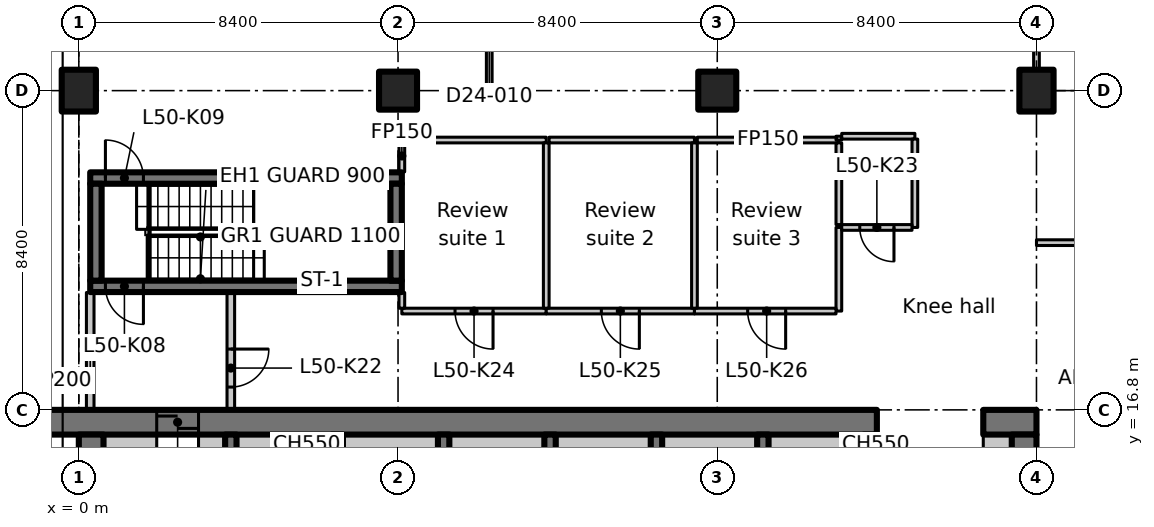
"""IFC4 building model, lengths in metres.
Left out: names, types, materials, properties, quantities, classifications, styles, units other than length and angle.
Written with IfcOpenShell. Run it as: python <this file> out.ifc"""

import sys

from ifc_helpers import new_model, si_unit, direction, frame, frame_2d, origin, origin_2d, place, context, subcontext, project, spatial, polyline, rectangle, outline, extrude, element, fill, save


model = new_model("IFC4")
c1 = context("Model", 3, precision=1e-05, world=origin(), true_north=direction((0.0, 1.0)))
c2 = subcontext(c1, "Body", "Model", "MODEL_VIEW")
j1 = project(units=[si_unit("LENGTHUNIT", "METRE"), si_unit("PLANEANGLEUNIT", "RADIAN")], contexts=[c1])
p1 = place(None, origin())
s1 = spatial("IfcSite", under=j1, at=p1, CompositionType="ELEMENT")
p2 = place(p1, origin())
s2 = spatial("IfcBuilding", under=s1, at=p2, CompositionType="ELEMENT")
p3 = place(p2, frame((0.0, 0.0, 199.2)))
s3 = spatial("IfcBuildingStorey", under=s2, at=p3, CompositionType="ELEMENT", Elevation=199.2)
p4 = place(p3, frame((0.0, 25.2, 0.0), z_axis=(0.0, 0.0, 1.0), x_axis=(1.0, 0.0, 0.0)))
e1 = element("IfcColumn", 1, at=p4, inside=s3, PredefinedType="COLUMN", context=c2, shape_type="SweptSolid", body=[
    extrude(rectangle(XDim=0.9, YDim=1.1, at=origin_2d()), origin(), (0.0, 0.0, 1.0), 3.35),
])
for number, where, z_axis, x_axis in (
    (2, (8.4, 25.2, 0.0), (0.0, 0.0, 1.0), (1.0, 0.0, 0.0)),
    (3, (16.8, 25.2, 0.0), (0.0, 0.0, 1.0), (1.0, 0.0, 0.0)),
):
    element("IfcColumn", number, at=place(p3, frame(where, z_axis=z_axis, x_axis=x_axis)), inside=s3, PredefinedType="COLUMN", context=c2, shape_type="SweptSolid", body=[
        extrude(rectangle(XDim=1.0, YDim=1.0, at=origin_2d()), origin(), (0.0, 0.0, 1.0), 3.35),
    ])
p5 = place(p3, frame((25.2, 25.2, 0.0), z_axis=(0.0, 0.0, 1.0), x_axis=(1.0, 0.0, 0.0)))
e4 = element("IfcColumn", 4, at=p5, inside=s3, PredefinedType="COLUMN", context=c2, shape_type="SweptSolid", body=[
    extrude(rectangle(XDim=0.9, YDim=1.1, at=origin_2d()), origin(), (0.0, 0.0, 1.0), 3.35),
])
p6 = place(p3, frame((-1.1, 16.475, 0.0), z_axis=(0.0, 0.0, 1.0), x_axis=(1.0, 0.0, 0.0)))
e5 = element("IfcWall", 5, at=p6, inside=s3, PredefinedType="SHEAR", context=c2, shape_type="SweptSolid", body=[
    extrude(rectangle(XDim=22.1, YDim=0.65, at=frame_2d((11.05, 0.0))), origin(), (0.0, 0.0, 1.0), 3.35),
])
p7 = place(p6, frame((3.15, 0.0, 0.0)))
e6 = element("IfcOpeningElement", 6, at=p7, cuts=e5, PredefinedType="OPENING", context=c2, shape_type="SweptSolid", body=[
    extrude(rectangle(XDim=1.1, YDim=2.3, at=frame_2d((0.55, 1.15))), frame((0.0, 0.335, 0.0), z_axis=(0.0, -1.0, 0.0), x_axis=(1.0, 0.0, 0.0)), (0.0, 0.0, 1.0), 0.67),
])
p8 = place(p3, frame((23.8, 16.475, 0.0), z_axis=(0.0, 0.0, 1.0), x_axis=(1.0, 0.0, 0.0)))
e7 = element("IfcWall", 7, at=p8, inside=s3, PredefinedType="SHEAR", context=c2, shape_type="SweptSolid", body=[
    extrude(rectangle(XDim=1.4, YDim=0.65, at=frame_2d((0.7, 0.0))), origin(), (0.0, 0.0, 1.0), 3.35),
])
p9 = place(p3, frame((0.325, 7.286, 0.0), z_axis=(0.0, 0.0, 1.0), x_axis=(0.0, 1.0, 0.0)))
e8 = element("IfcWall", 8, at=p9, inside=s3, PredefinedType="SHEAR", context=c2, shape_type="SweptSolid", body=[
    extrude(rectangle(XDim=8.864, YDim=0.65, at=frame_2d((4.432, 0.0))), origin(), (0.0, 0.0, 1.0), 3.35),
])
p10 = place(p3, frame((24.875, 12.6, 0.0), z_axis=(0.0, 0.0, 1.0), x_axis=(0.0, 1.0, 0.0)))
e9 = element("IfcWall", 9, at=p10, inside=s3, PredefinedType="SHEAR", context=c2, shape_type="SweptSolid", body=[
    extrude(rectangle(XDim=3.55, YDim=0.65, at=frame_2d((1.775, 0.0))), origin(), (0.0, 0.0, 1.0), 3.35),
])
p11 = place(p3, frame((0.65, 15.875, 0.0), z_axis=(0.0, 0.0, 1.0), x_axis=(1.0, 0.0, 0.0)))
e10 = element("IfcWall", 10, at=p11, inside=s3, PredefinedType="PARTITIONING", context=c2, shape_type="SweptSolid", body=[
    extrude(rectangle(XDim=1.4, YDim=0.55, at=frame_2d((0.7, 0.0))), origin(), (0.0, 0.0, 1.0), 3.35),
])
p12 = place(p3, frame((23.8, 15.875, 0.0), z_axis=(0.0, 0.0, 1.0), x_axis=(1.0, 0.0, 0.0)))
e11 = element("IfcWall", 11, at=p12, inside=s3, PredefinedType="PARTITIONING", context=c2, shape_type="SweptSolid", body=[
    extrude(rectangle(XDim=0.75, YDim=0.55, at=frame_2d((0.375, 0.0))), origin(), (0.0, 0.0, 1.0), 3.35),
])
for number, where, z_axis, x_axis in (
    (12, (4.0, 12.95, 0.0), (0.0, 0.0, 1.0), (0.0, 1.0, 0.0)),
    (13, (6.8, 12.95, 0.0), (0.0, 0.0, 1.0), (0.0, 1.0, 0.0)),
    (14, (9.6, 12.95, 0.0), (0.0, 0.0, 1.0), (0.0, 1.0, 0.0)),
    (15, (12.4, 12.95, 0.0), (0.0, 0.0, 1.0), (0.0, 1.0, 0.0)),
    (16, (15.2, 12.95, 0.0), (0.0, 0.0, 1.0), (0.0, 1.0, 0.0)),
    (17, (18.0, 12.95, 0.0), (0.0, 0.0, 1.0), (0.0, 1.0, 0.0)),
    (18, (20.8, 12.95, 0.0), (0.0, 0.0, 1.0), (0.0, 1.0, 0.0)),
):
    element("IfcWall", number, at=place(p3, frame(where, z_axis=z_axis, x_axis=x_axis)), inside=s3, PredefinedType="SHEAR", context=c2, shape_type="SweptSolid", body=[
        extrude(rectangle(XDim=3.2, YDim=0.3, at=frame_2d((1.6, 0.0))), origin(), (0.0, 0.0, 1.0), 3.35),
    ])
p13 = place(p3, frame((8.5, 20.05, 0.0), z_axis=(0.0, 0.0, 1.0), x_axis=(-1.0, 0.0, 0.0)))
e19 = element("IfcWall", 19, at=p13, inside=s3, PredefinedType="SHEAR", context=c2, shape_type="SweptSolid", body=[
    extrude(rectangle(XDim=8.2, YDim=0.3, at=frame_2d((4.1, 0.0))), origin(), (0.0, 0.0, 1.0), 3.35),
])
p14 = place(p13, frame((6.8, 0.0, 0.0)))
e20 = element("IfcOpeningElement", 20, at=p14, cuts=e19, PredefinedType="OPENING", context=c2, shape_type="SweptSolid", body=[
    extrude(rectangle(XDim=1.0, YDim=2.1, at=frame_2d((0.5, 1.05))), frame((0.0, 0.16, 0.0), z_axis=(0.0, -1.0, 0.0), x_axis=(1.0, 0.0, 0.0)), (0.0, 0.0, 1.0), 0.32),
])
p15 = place(p3, frame((0.3, 22.9, 0.0), z_axis=(0.0, 0.0, 1.0), x_axis=(1.0, 0.0, 0.0)))
e21 = element("IfcWall", 21, at=p15, inside=s3, PredefinedType="SHEAR", context=c2, shape_type="SweptSolid", body=[
    extrude(rectangle(XDim=8.2, YDim=0.3, at=frame_2d((4.1, 0.0))), origin(), (0.0, 0.0, 1.0), 3.35),
])
p16 = place(p15, frame((0.4, 0.0, 0.0)))
e22 = element("IfcOpeningElement", 22, at=p16, cuts=e21, PredefinedType="OPENING", context=c2, shape_type="SweptSolid", body=[
    extrude(rectangle(XDim=1.0, YDim=2.1, at=frame_2d((0.5, 1.05))), frame((0.0, 0.16, 0.0), z_axis=(0.0, -1.0, 0.0), x_axis=(1.0, 0.0, 0.0)), (0.0, 0.0, 1.0), 0.32),
])
for number, where, z_axis, x_axis in (
    (23, (0.45, 20.2, 0.0), (0.0, 0.0, 1.0), (0.0, 1.0, 0.0)),
    (24, (8.35, 20.2, 0.0), (0.0, 0.0, 1.0), (0.0, 1.0, 0.0)),
):
    element("IfcWall", number, at=place(p3, frame(where, z_axis=z_axis, x_axis=x_axis)), inside=s3, PredefinedType="SHEAR", context=c2, shape_type="SweptSolid", body=[
        extrude(rectangle(XDim=2.55, YDim=0.3, at=frame_2d((1.275, 0.0))), origin(), (0.0, 0.0, 1.0), 3.35),
    ])
p17 = place(p3, frame((0.3, 16.812, 0.0), z_axis=(0.0, 0.0, 1.0), x_axis=(0.0, 1.0, 0.0)))
e25 = element("IfcWall", 25, at=p17, inside=s3, PredefinedType="PARTITIONING", context=c2, shape_type="SweptSolid", body=[
    extrude(rectangle(XDim=3.076, YDim=0.2, at=frame_2d((1.538, 0.0))), origin(), (0.0, 0.0, 1.0), 2.98),
])
p18 = place(p3, frame((4.0, 19.888, 0.0), z_axis=(0.0, 0.0, 1.0), x_axis=(0.0, -1.0, 0.0)))
e26 = element("IfcWall", 26, at=p18, inside=s3, PredefinedType="PARTITIONING", context=c2, shape_type="SweptSolid", body=[
    extrude(rectangle(XDim=3.076, YDim=0.2, at=frame_2d((1.538, 0.0))), origin(), (0.0, 0.0, 1.0), 3.35),
])
p19 = place(p18, frame((1.488, 0.0, 0.0)))
e27 = element("IfcOpeningElement", 27, at=p19, cuts=e26, PredefinedType="OPENING", context=c2, shape_type="SweptSolid", body=[
    extrude(rectangle(XDim=1.0, YDim=2.1, at=frame_2d((0.5, 1.05))), frame((0.0, 0.11, 0.0), z_axis=(0.0, -1.0, 0.0), x_axis=(1.0, 0.0, 0.0)), (0.0, 0.0, 1.0), 0.22),
])
p20 = place(p3, frame((12.3, 19.4, 0.0), z_axis=(0.0, 0.0, 1.0), x_axis=(-1.0, 0.0, 0.0)))
e28 = element("IfcWall", 28, at=p20, inside=s3, PredefinedType="PARTITIONING", context=c2, shape_type="SweptSolid", body=[
    extrude(rectangle(XDim=3.8, YDim=0.15, at=frame_2d((1.9, 0.0))), origin(), (0.0, 0.0, 1.0), 3.35),
])
p21 = place(p20, frame((1.4, 0.0, 0.0)))
e29 = element("IfcOpeningElement", 29, at=p21, cuts=e28, PredefinedType="OPENING", context=c2, shape_type="SweptSolid", body=[
    extrude(rectangle(XDim=1.0, YDim=2.1, at=frame_2d((0.5, 1.05))), frame((0.0, 0.085, 0.0), z_axis=(0.0, -1.0, 0.0), x_axis=(1.0, 0.0, 0.0)), (0.0, 0.0, 1.0), 0.17),
])
p22 = place(p3, frame((8.5, 19.475, 0.0), z_axis=(0.0, 0.0, 1.0), x_axis=(0.0, 1.0, 0.0)))
e30 = element("IfcWall", 30, at=p22, inside=s3, PredefinedType="PARTITIONING", context=c2, shape_type="SweptSolid", body=[
    extrude(rectangle(XDim=0.413, YDim=0.15, at=frame_2d((0.207, 0.0))), origin(), (0.0, 0.0, 1.0), 3.35),
])
p23 = place(p3, frame((8.5, 23.062, 0.0), z_axis=(0.0, 0.0, 1.0), x_axis=(0.0, 1.0, 0.0)))
e31 = element("IfcWall", 31, at=p23, inside=s3, PredefinedType="PARTITIONING", context=c2, shape_type="SweptSolid", body=[
    extrude(rectangle(XDim=0.838, YDim=0.15, at=frame_2d((0.419, 0.0))), origin(), (0.0, 0.0, 1.0), 3.35),
])
p24 = place(p3, frame((8.575, 23.9, 0.0), z_axis=(0.0, 0.0, 1.0), x_axis=(1.0, 0.0, 0.0)))
e32 = element("IfcWall", 32, at=p24, inside=s3, PredefinedType="PARTITIONING", context=c2, shape_type="SweptSolid", body=[
    extrude(rectangle(XDim=3.725, YDim=0.15, at=frame_2d((1.863, 0.0))), origin(), (0.0, 0.0, 1.0), 3.35),
])
p25 = place(p3, frame((16.2, 19.4, 0.0), z_axis=(0.0, 0.0, 1.0), x_axis=(-1.0, 0.0, 0.0)))
e33 = element("IfcWall", 33, at=p25, inside=s3, PredefinedType="PARTITIONING", context=c2, shape_type="SweptSolid", body=[
    extrude(rectangle(XDim=3.9, YDim=0.15, at=frame_2d((1.95, 0.0))), origin(), (0.0, 0.0, 1.0), 3.35),
])
p26 = place(p25, frame((1.45, 0.0, 0.0)))
e34 = element("IfcOpeningElement", 34, at=p26, cuts=e33, PredefinedType="OPENING", context=c2, shape_type="SweptSolid", body=[
    extrude(rectangle(XDim=1.0, YDim=2.1, at=frame_2d((0.5, 1.05))), frame((0.0, 0.085, 0.0), z_axis=(0.0, -1.0, 0.0), x_axis=(1.0, 0.0, 0.0)), (0.0, 0.0, 1.0), 0.17),
])
p27 = place(p3, frame((12.3, 23.825, 0.0), z_axis=(0.0, 0.0, 1.0), x_axis=(0.0, -1.0, 0.0)))
e35 = element("IfcWall", 35, at=p27, inside=s3, PredefinedType="PARTITIONING", context=c2, shape_type="SweptSolid", body=[
    extrude(rectangle(XDim=4.35, YDim=0.15, at=frame_2d((2.175, 0.0))), origin(), (0.0, 0.0, 1.0), 3.35),
])
p28 = place(p3, frame((12.375, 23.9, 0.0), z_axis=(0.0, 0.0, 1.0), x_axis=(1.0, 0.0, 0.0)))
e36 = element("IfcWall", 36, at=p28, inside=s3, PredefinedType="PARTITIONING", context=c2, shape_type="SweptSolid", body=[
    extrude(rectangle(XDim=3.825, YDim=0.15, at=frame_2d((1.913, 0.0))), origin(), (0.0, 0.0, 1.0), 3.35),
])
p29 = place(p3, frame((20.0, 21.6, 0.0), z_axis=(0.0, 0.0, 1.0), x_axis=(0.0, -1.0, 0.0)))
e37 = element("IfcWall", 37, at=p29, inside=s3, PredefinedType="PARTITIONING", context=c2, shape_type="SweptSolid", body=[
    extrude(rectangle(XDim=2.2, YDim=0.15, at=frame_2d((1.1, 0.0))), origin(), (0.0, 0.0, 1.0), 3.35),
])
p30 = place(p3, frame((19.925, 19.4, 0.0), z_axis=(0.0, 0.0, 1.0), x_axis=(-1.0, 0.0, 0.0)))
e38 = element("IfcWall", 38, at=p30, inside=s3, PredefinedType="PARTITIONING", context=c2, shape_type="SweptSolid", body=[
    extrude(rectangle(XDim=3.725, YDim=0.15, at=frame_2d((1.863, 0.0))), origin(), (0.0, 0.0, 1.0), 3.35),
])
p31 = place(p30, frame((1.325, 0.0, 0.0)))
e39 = element("IfcOpeningElement", 39, at=p31, cuts=e38, PredefinedType="OPENING", context=c2, shape_type="SweptSolid", body=[
    extrude(rectangle(XDim=1.0, YDim=2.1, at=frame_2d((0.5, 1.05))), frame((0.0, 0.085, 0.0), z_axis=(0.0, -1.0, 0.0), x_axis=(1.0, 0.0, 0.0)), (0.0, 0.0, 1.0), 0.17),
])
p32 = place(p3, frame((16.2, 23.825, 0.0), z_axis=(0.0, 0.0, 1.0), x_axis=(0.0, -1.0, 0.0)))
e40 = element("IfcWall", 40, at=p32, inside=s3, PredefinedType="PARTITIONING", context=c2, shape_type="SweptSolid", body=[
    extrude(rectangle(XDim=4.35, YDim=0.15, at=frame_2d((2.175, 0.0))), origin(), (0.0, 0.0, 1.0), 3.35),
])
p33 = place(p3, frame((16.275, 23.9, 0.0), z_axis=(0.0, 0.0, 1.0), x_axis=(1.0, 0.0, 0.0)))
e41 = element("IfcWall", 41, at=p33, inside=s3, PredefinedType="PARTITIONING", context=c2, shape_type="SweptSolid", body=[
    extrude(rectangle(XDim=3.725, YDim=0.15, at=frame_2d((1.863, 0.0))), origin(), (0.0, 0.0, 1.0), 3.35),
])
p34 = place(p3, frame((20.0, 23.9, 0.0), z_axis=(0.0, 0.0, 1.0), x_axis=(0.0, 1.0, 0.0)))
e42 = element("IfcWall", 42, at=p34, inside=s3, PredefinedType="PARTITIONING", context=c2, shape_type="SweptSolid", body=[
    extrude(rectangle(XDim=0.1, YDim=0.15, at=frame_2d((0.05, 0.0))), origin(), (0.0, 0.0, 1.0), 3.35),
])
p35 = place(p3, frame((20.075, 24.0, 0.0), z_axis=(0.0, 0.0, 1.0), x_axis=(1.0, 0.0, 0.0)))
e43 = element("IfcWall", 43, at=p35, inside=s3, PredefinedType="PARTITIONING", context=c2, shape_type="SweptSolid", body=[
    extrude(rectangle(XDim=1.925, YDim=0.15, at=frame_2d((0.962, 0.0))), origin(), (0.0, 0.0, 1.0), 3.35),
])
p36 = place(p3, frame((22.0, 23.925, 0.0), z_axis=(0.0, 0.0, 1.0), x_axis=(0.0, -1.0, 0.0)))
e44 = element("IfcWall", 44, at=p36, inside=s3, PredefinedType="PARTITIONING", context=c2, shape_type="SweptSolid", body=[
    extrude(rectangle(XDim=2.325, YDim=0.15, at=frame_2d((1.163, 0.0))), origin(), (0.0, 0.0, 1.0), 3.35),
])
p37 = place(p3, frame((21.925, 21.6, 0.0), z_axis=(0.0, 0.0, 1.0), x_axis=(-1.0, 0.0, 0.0)))
e45 = element("IfcWall", 45, at=p37, inside=s3, PredefinedType="PARTITIONING", context=c2, shape_type="SweptSolid", body=[
    extrude(rectangle(XDim=1.85, YDim=0.15, at=frame_2d((0.925, 0.0))), origin(), (0.0, 0.0, 1.0), 3.35),
])
p38 = place(p37, frame((0.475, 0.0, 0.0)))
e46 = element("IfcOpeningElement", 46, at=p38, cuts=e45, PredefinedType="OPENING", context=c2, shape_type="SweptSolid", body=[
    extrude(rectangle(XDim=0.9, YDim=2.1, at=frame_2d((0.45, 1.05))), frame((0.0, 0.085, 0.0), z_axis=(0.0, -1.0, 0.0), x_axis=(1.0, 0.0, 0.0)), (0.0, 0.0, 1.0), 0.17),
])
p39 = place(p3, frame((20.0, 21.675, 0.0), z_axis=(0.0, 0.0, 1.0), x_axis=(0.0, 1.0, 0.0)))
e47 = element("IfcWall", 47, at=p39, inside=s3, PredefinedType="PARTITIONING", context=c2, shape_type="SweptSolid", body=[
    extrude(rectangle(XDim=2.15, YDim=0.15, at=frame_2d((1.075, 0.0))), origin(), (0.0, 0.0, 1.0), 3.35),
])
p40 = place(p3, frame((3.15, 15.875, 0.0), z_axis=(0.0, 0.0, 1.0), x_axis=(1.0, 0.0, 0.0)))
e48 = element("IfcWall", 48, at=p40, inside=s3, PredefinedType="PARTITIONING", context=c2, shape_type="SweptSolid", body=[
    extrude(rectangle(XDim=0.7, YDim=0.55, at=frame_2d((0.35, 0.0))), origin(), (0.0, 0.0, 1.0), 3.35),
])
for number, where, z_axis, x_axis in (
    (49, (4.15, 15.875, 0.0), (0.0, 0.0, 1.0), (1.0, 0.0, 0.0)),
    (50, (6.95, 15.875, 0.0), (0.0, 0.0, 1.0), (1.0, 0.0, 0.0)),
    (51, (9.75, 15.875, 0.0), (0.0, 0.0, 1.0), (1.0, 0.0, 0.0)),
    (52, (12.55, 15.875, 0.0), (0.0, 0.0, 1.0), (1.0, 0.0, 0.0)),
    (53, (15.35, 15.875, 0.0), (0.0, 0.0, 1.0), (1.0, 0.0, 0.0)),
    (54, (18.15, 15.875, 0.0), (0.0, 0.0, 1.0), (1.0, 0.0, 0.0)),
):
    element("IfcWall", number, at=place(p3, frame(where, z_axis=z_axis, x_axis=x_axis)), inside=s3, PredefinedType="PARTITIONING", context=c2, shape_type="SweptSolid", body=[
        extrude(rectangle(XDim=2.5, YDim=0.55, at=frame_2d((1.25, 0.0))), origin(), (0.0, 0.0, 1.0), 3.35),
    ])
p41 = place(p3, frame((20.95, 15.875, 0.0), z_axis=(0.0, 0.0, 1.0), x_axis=(1.0, 0.0, 0.0)))
e55 = element("IfcWall", 55, at=p41, inside=s3, PredefinedType="PARTITIONING", context=c2, shape_type="SweptSolid", body=[
    extrude(rectangle(XDim=0.05, YDim=0.55, at=frame_2d((0.025, 0.0))), origin(), (0.0, 0.0, 1.0), 3.35),
])
p42 = place(p3, frame((25.2, 21.2, 0.0), z_axis=(0.0, 0.0, 1.0), x_axis=(1.0, 0.0, 0.0)))
e56 = element("IfcWall", 56, at=p42, inside=s3, PredefinedType="PARTITIONING", context=c2, shape_type="SweptSolid", body=[
    extrude(rectangle(XDim=4.2, YDim=0.15, at=frame_2d((2.1, 0.0))), origin(), (0.0, 0.0, 1.0), 3.33),
])
p43 = place(p3, frame((25.2, 31.0, 0.0), z_axis=(0.0, 0.0, 1.0), x_axis=(0.0, -1.0, 0.0)))
e57 = element("IfcWall", 57, at=p43, inside=s3, PredefinedType="PARTITIONING", context=c2, shape_type="SweptSolid", body=[
    extrude(outline(polyline([(0.0, 0.0), (5.23, 0.0), (5.23, 2.98), (0.0, 2.98), (0.0, 0.0)])), frame((0.0, 0.075, 0.0), z_axis=(0.0, -1.0, 0.0), x_axis=(1.0, 0.0, 0.0)), (0.0, 0.0, 1.0), 0.15),
])
p44 = place(p43, frame((2.03, 0.0, 0.0)))
e58 = element("IfcOpeningElement", 58, at=p44, cuts=e57, PredefinedType="OPENING", context=c2, shape_type="SweptSolid", body=[
    extrude(rectangle(XDim=1.1, YDim=2.1, at=frame_2d((0.55, 1.05))), frame((0.0, 0.085, 0.0), z_axis=(0.0, -1.0, 0.0), x_axis=(1.0, 0.0, 0.0)), (0.0, 0.0, 1.0), 0.17),
])
p45 = place(p3, frame((10.8, 25.2, 0.0), z_axis=(0.0, 0.0, 1.0), x_axis=(0.0, 1.0, 0.0)))
e59 = element("IfcWall", 59, at=p45, inside=s3, PredefinedType="PARTITIONING", context=c2, shape_type="SweptSolid", body=[
    extrude(rectangle(XDim=4.2, YDim=0.15, at=frame_2d((2.1, 0.0))), origin(), (0.0, 0.0, 1.0), 3.33),
])
p46 = place(p45, frame((1.5, 0.0, 0.0)))
e60 = element("IfcOpeningElement", 60, at=p46, cuts=e59, PredefinedType="OPENING", context=c2, shape_type="SweptSolid", body=[
    extrude(rectangle(XDim=1.1, YDim=2.1, at=frame_2d((0.55, 1.05))), frame((0.0, 0.085, 0.0), z_axis=(0.0, -1.0, 0.0), x_axis=(1.0, 0.0, 0.0)), (0.0, 0.0, 1.0), 0.17),
])
p47 = place(p7, origin())
e61 = element("IfcDoor", 61, at=p47, inside=s3, OperationType="SLIDING_TO_LEFT", PredefinedType="DOOR", context=c2, shape_type="SweptSolid", body=[
    extrude(rectangle(XDim=1.1, YDim=2.3, at=frame_2d((0.55, 1.15))), frame((0.0, 0.025, 0.0), z_axis=(0.0, -1.0, 0.0), x_axis=(1.0, 0.0, 0.0)), (0.0, 0.0, 1.0), 0.05),
])
fill(e6, e61)
p48 = place(p14, origin())
e62 = element("IfcDoor", 62, at=p48, inside=s3, OperationType="SINGLE_SWING_LEFT", PredefinedType="DOOR", context=c2, shape_type="SweptSolid", body=[
    extrude(rectangle(XDim=1.0, YDim=2.1, at=frame_2d((0.5, 1.05))), frame((0.0, 0.025, 0.0), z_axis=(0.0, -1.0, 0.0), x_axis=(1.0, 0.0, 0.0)), (0.0, 0.0, 1.0), 0.05),
])
fill(e20, e62)
p49 = place(p16, origin())
e63 = element("IfcDoor", 63, at=p49, inside=s3, OperationType="SINGLE_SWING_RIGHT", PredefinedType="DOOR", context=c2, shape_type="SweptSolid", body=[
    extrude(rectangle(XDim=1.0, YDim=2.1, at=frame_2d((0.5, 1.05))), frame((0.0, 0.025, 0.0), z_axis=(0.0, -1.0, 0.0), x_axis=(1.0, 0.0, 0.0)), (0.0, 0.0, 1.0), 0.05),
])
fill(e22, e63)
p50 = place(p19, origin())
e64 = element("IfcDoor", 64, at=p50, inside=s3, OperationType="SINGLE_SWING_LEFT", PredefinedType="DOOR", context=c2, shape_type="SweptSolid", body=[
    extrude(rectangle(XDim=1.0, YDim=2.1, at=frame_2d((0.5, 1.05))), frame((0.0, 0.025, 0.0), z_axis=(0.0, -1.0, 0.0), x_axis=(1.0, 0.0, 0.0)), (0.0, 0.0, 1.0), 0.05),
])
fill(e27, e64)
p51 = place(p38, origin())
e65 = element("IfcDoor", 65, at=p51, inside=s3, OperationType="SINGLE_SWING_RIGHT", PredefinedType="DOOR", context=c2, shape_type="SweptSolid", body=[
    extrude(rectangle(XDim=0.9, YDim=2.1, at=frame_2d((0.45, 1.05))), frame((0.0, 0.025, 0.0), z_axis=(0.0, -1.0, 0.0), x_axis=(1.0, 0.0, 0.0)), (0.0, 0.0, 1.0), 0.05),
])
fill(e46, e65)
p52 = place(p21, origin())
e66 = element("IfcDoor", 66, at=p52, inside=s3, OperationType="SINGLE_SWING_LEFT", PredefinedType="DOOR", context=c2, shape_type="SweptSolid", body=[
    extrude(rectangle(XDim=1.0, YDim=2.1, at=frame_2d((0.5, 1.05))), frame((0.0, 0.025, 0.0), z_axis=(0.0, -1.0, 0.0), x_axis=(1.0, 0.0, 0.0)), (0.0, 0.0, 1.0), 0.05),
])
fill(e29, e66)
p53 = place(p26, origin())
e67 = element("IfcDoor", 67, at=p53, inside=s3, OperationType="SINGLE_SWING_RIGHT", PredefinedType="DOOR", context=c2, shape_type="SweptSolid", body=[
    extrude(rectangle(XDim=1.0, YDim=2.1, at=frame_2d((0.5, 1.05))), frame((0.0, 0.025, 0.0), z_axis=(0.0, -1.0, 0.0), x_axis=(1.0, 0.0, 0.0)), (0.0, 0.0, 1.0), 0.05),
])
fill(e34, e67)
p54 = place(p31, origin())
e68 = element("IfcDoor", 68, at=p54, inside=s3, OperationType="SINGLE_SWING_LEFT", PredefinedType="DOOR", context=c2, shape_type="SweptSolid", body=[
    extrude(rectangle(XDim=1.0, YDim=2.1, at=frame_2d((0.5, 1.05))), frame((0.0, 0.025, 0.0), z_axis=(0.0, -1.0, 0.0), x_axis=(1.0, 0.0, 0.0)), (0.0, 0.0, 1.0), 0.05),
])
fill(e39, e68)
save(model, sys.argv[1])
